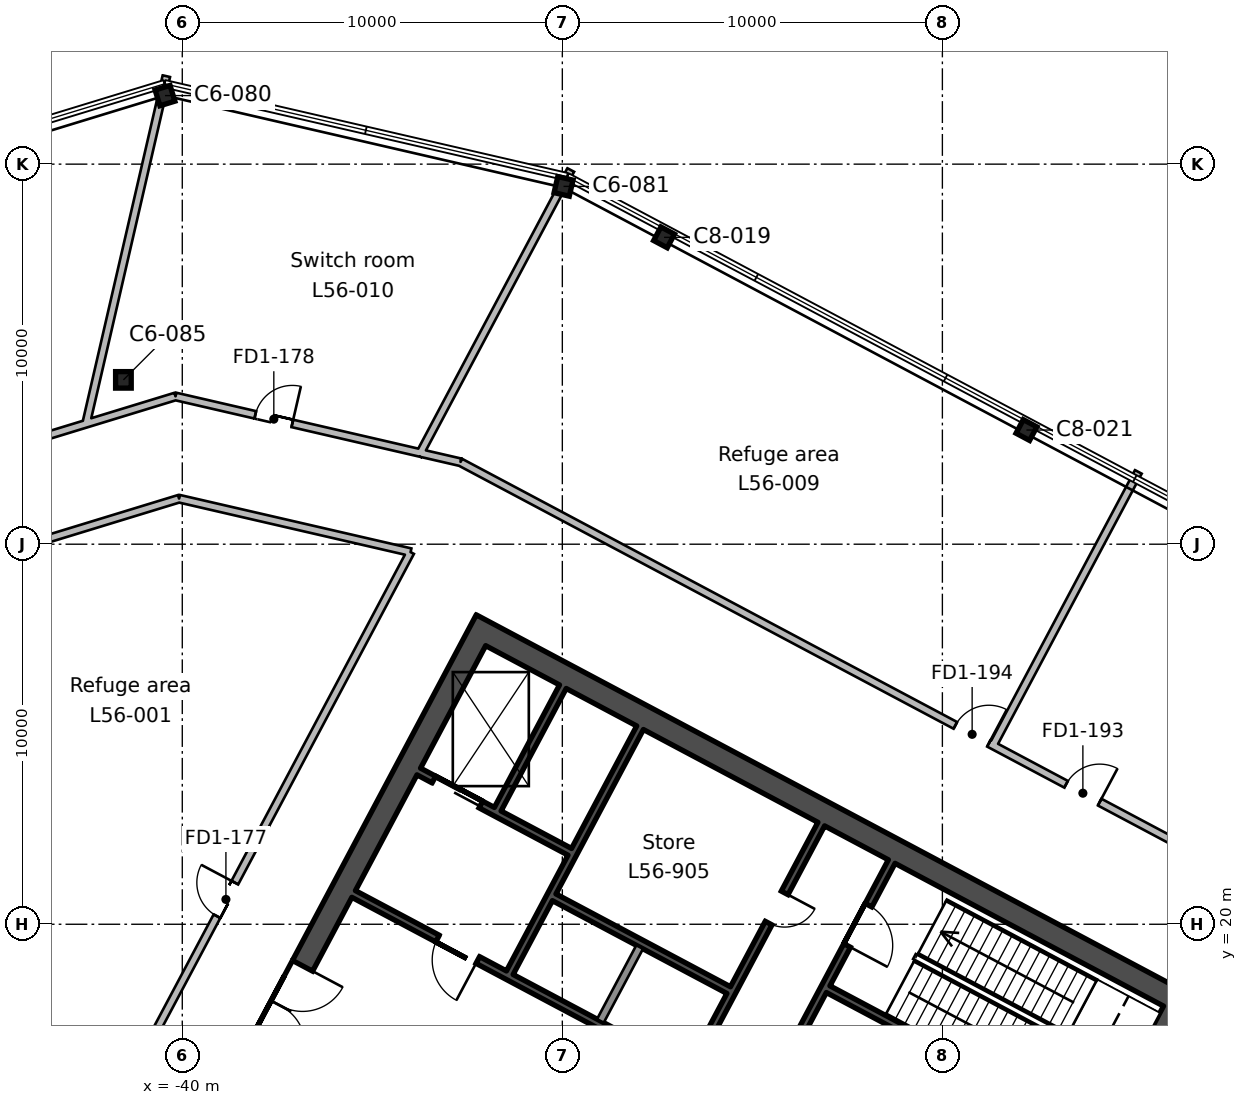
"""IFC4 building model, lengths in metres.
Left out: names, types, materials, properties, quantities, classifications, styles, units other than length and angle.
Written with IfcOpenShell. Run it as: python <this file> out.ifc"""

import sys

from ifc_helpers import new_model, si_unit, direction, frame, frame_2d, origin, origin_2d, place, context, subcontext, project, spatial, rectangle, i_section, extrude, element, fill, save


model = new_model("IFC4")
c1 = context("Model", 3, precision=1e-05, world=origin(), true_north=direction((0.0, 1.0)))
c2 = subcontext(c1, "Body", "Model", "MODEL_VIEW")
j1 = project(units=[si_unit("LENGTHUNIT", "METRE"), si_unit("PLANEANGLEUNIT", "RADIAN")], contexts=[c1])
p1 = place(None, origin())
s1 = spatial("IfcSite", under=j1, at=p1, CompositionType="ELEMENT")
p2 = place(p1, origin())
s2 = spatial("IfcBuilding", under=s1, at=p2, CompositionType="ELEMENT")
p3 = place(p2, frame((0.0, 0.0, 252.0)))
s3 = spatial("IfcBuildingStorey", under=s2, at=p3, CompositionType="ELEMENT", Elevation=252.0)
p4 = place(p3, frame((-17.788, 33.004, 0.0), z_axis=(0.0, 0.0, 1.0), x_axis=(-0.882947592859, 0.469471562786, 0.0)))
e1 = element("IfcColumn", 1, at=p4, inside=s3, PredefinedType="COLUMN", context=c2, shape_type="SweptSolid", body=[
    extrude(i_section(OverallWidth=0.404, OverallDepth=0.406, WebThickness=0.027, FlangeThickness=0.044, FilletRadius=0.015, at=origin_2d()), origin(), (0.0, 0.0, 1.0), 6.0),
])
p5 = place(p3, frame((-41.549, 34.324, 0.0), z_axis=(0.0, 0.0, 1.0), x_axis=(1.0, 0.0, 0.0)))
e2 = element("IfcColumn", 2, at=p5, inside=s3, PredefinedType="COLUMN", context=c2, shape_type="SweptSolid", body=[
    extrude(i_section(OverallWidth=0.412, OverallDepth=0.434, WebThickness=0.036, FlangeThickness=0.057, FilletRadius=0.015, at=origin_2d()), origin(), (0.0, 0.0, 1.0), 6.0),
])
p6 = place(p3, frame((-27.323, 38.074, 0.0), z_axis=(0.0, 0.0, 1.0), x_axis=(-0.882947592859, 0.469471562786, 0.0)))
e3 = element("IfcColumn", 3, at=p6, inside=s3, PredefinedType="COLUMN", context=c2, shape_type="SweptSolid", body=[
    extrude(i_section(OverallWidth=0.404, OverallDepth=0.406, WebThickness=0.027, FlangeThickness=0.044, FilletRadius=0.015, at=origin_2d()), origin(), (0.0, 0.0, 1.0), 6.0),
])
for number, where, z_axis, x_axis in (
    (4, (-29.968, 39.415, 0.0), (0.0, 0.0, 1.0), (-0.974, 0.225, 0.0)),
    (5, (-40.455, 41.804, 0.0), (0.0, 0.0, 1.0), (-0.956, -0.292, 0.0)),
):
    element("IfcColumn", number, at=place(p3, frame(where, z_axis=z_axis, x_axis=x_axis)), inside=s3, PredefinedType="COLUMN", context=c2, shape_type="SweptSolid", body=[
        extrude(i_section(OverallWidth=0.412, OverallDepth=0.434, WebThickness=0.036, FlangeThickness=0.057, FilletRadius=0.015, at=origin_2d()), origin(), (0.0, 0.0, 1.0), 6.0),
    ])
p7 = place(p3, frame((-13.635, 18.236, 0.0), z_axis=(0.0, 0.0, 1.0), x_axis=(-0.469478769487, -0.88294376095, 0.0)))
e6 = element("IfcWall", 6, at=p7, inside=s3, PredefinedType="SHEAR", context=c2, shape_type="SweptSolid", body=[
    extrude(rectangle(XDim=19.4, YDim=0.6, at=frame_2d((9.7, 0.0))), origin(), (0.0, 0.0, 1.0), 6.0),
])
p8 = place(p7, frame((6.7, 0.0, 0.0)))
e7 = element("IfcOpeningElement", 7, at=p8, cuts=e6, PredefinedType="OPENING", context=c2, shape_type="SweptSolid", body=[
    extrude(rectangle(XDim=2.4, YDim=2.4, at=frame_2d((1.2, 1.2))), frame((0.0, 0.31, 0.0), z_axis=(0.0, -1.0, 0.0), x_axis=(1.0, 0.0, 0.0)), (0.0, 0.0, 1.0), 0.62),
])
p9 = place(p3, frame((-32.0, 28.001, 0.0), z_axis=(0.0, 0.0, 1.0), x_axis=(-0.469468958625, -0.882948977511, 0.0)))
e8 = element("IfcWall", 8, at=p9, inside=s3, PredefinedType="SHEAR", context=c2, shape_type="SweptSolid", body=[
    extrude(rectangle(XDim=19.4, YDim=0.6, at=frame_2d((9.7, 0.0))), origin(), (0.0, 0.0, 1.0), 6.0),
])
p10 = place(p9, frame((10.3, 0.0, 0.0)))
e9 = element("IfcOpeningElement", 9, at=p10, cuts=e8, PredefinedType="OPENING", context=c2, shape_type="SweptSolid", body=[
    extrude(rectangle(XDim=2.4, YDim=2.4, at=frame_2d((1.2, 1.2))), frame((0.0, 0.31, 0.0), z_axis=(0.0, -1.0, 0.0), x_axis=(1.0, 0.0, 0.0)), (0.0, 0.0, 1.0), 0.62),
])
p11 = place(p3, frame((-14.041, 18.112, 0.0), z_axis=(0.0, 0.0, 1.0), x_axis=(-0.882947755831, 0.46947125628, 0.0)))
e10 = element("IfcWall", 10, at=p11, inside=s3, PredefinedType="SHEAR", context=c2, shape_type="SweptSolid", body=[
    extrude(rectangle(XDim=20.2, YDim=0.6, at=frame_2d((10.1, 0.0))), origin(), (0.0, 0.0, 1.0), 6.0),
])
p12 = place(p3, frame((-21.333, 21.649, 0.0), z_axis=(0.0, 0.0, 1.0), x_axis=(-0.469494272526, -0.882935517501, 0.0)))
e11 = element("IfcWall", 11, at=p12, inside=s3, PredefinedType="SHEAR", context=c2, shape_type="SweptSolid", body=[
    extrude(rectangle(XDim=7.3, YDim=0.2, at=frame_2d((3.65, 0.0))), origin(), (0.0, 0.0, 1.0), 6.0),
])
p13 = place(p12, frame((1.3, 0.0, 0.0)))
e12 = element("IfcOpeningElement", 12, at=p13, cuts=e11, PredefinedType="OPENING", context=c2, shape_type="SweptSolid", body=[
    extrude(rectangle(XDim=1.2, YDim=2.1, at=frame_2d((0.6, 1.05))), frame((0.0, 0.11, 0.0), z_axis=(0.0, -1.0, 0.0), x_axis=(1.0, 0.0, 0.0)), (0.0, 0.0, 1.0), 0.22),
])
p14 = place(p3, frame((-23.188, 22.635, 0.0), z_axis=(0.0, 0.0, 1.0), x_axis=(-0.469454336211, -0.882956752176, 0.0)))
e13 = element("IfcWall", 13, at=p14, inside=s3, PredefinedType="SHEAR", context=c2, shape_type="SweptSolid", body=[
    extrude(rectangle(XDim=7.3, YDim=0.2, at=frame_2d((3.65, 0.0))), origin(), (0.0, 0.0, 1.0), 6.0),
])
p15 = place(p14, frame((2.05, 0.0, 0.0)))
e14 = element("IfcOpeningElement", 14, at=p15, cuts=e13, PredefinedType="OPENING", context=c2, shape_type="SweptSolid", body=[
    extrude(rectangle(XDim=0.9, YDim=2.1, at=frame_2d((0.45, 1.05))), frame((0.0, 0.11, 0.0), z_axis=(0.0, -1.0, 0.0), x_axis=(1.0, 0.0, 0.0)), (0.0, 0.0, 1.0), 0.22),
])
p16 = place(p3, frame((-27.966, 19.4, 0.0), z_axis=(0.0, 0.0, 1.0), x_axis=(-0.4694473164, -0.882960484464, 0.0)))
e15 = element("IfcWall", 15, at=p16, inside=s3, PredefinedType="SOLIDWALL", context=c2, shape_type="SweptSolid", body=[
    extrude(rectangle(XDim=2.2, YDim=0.2, at=frame_2d((1.1, 0.0))), origin(), (0.0, 0.0, 1.0), 6.0),
])
p17 = place(p3, frame((-27.955, 25.171, 0.0), z_axis=(0.0, 0.0, 1.0), x_axis=(-0.469480409012, -0.88294288918, 0.0)))
e16 = element("IfcWall", 16, at=p17, inside=s3, PredefinedType="SHEAR", context=c2, shape_type="SweptSolid", body=[
    extrude(rectangle(XDim=7.3, YDim=0.2, at=frame_2d((3.65, 0.0))), origin(), (0.0, 0.0, 1.0), 6.0),
])
p18 = place(p3, frame((-29.986, 26.25, 0.0), z_axis=(0.0, 0.0, 1.0), x_axis=(-0.469494272526, -0.882935517501, 0.0)))
e17 = element("IfcWall", 17, at=p18, inside=s3, PredefinedType="SHEAR", context=c2, shape_type="SweptSolid", body=[
    extrude(rectangle(XDim=3.65, YDim=0.2, at=frame_2d((1.825, 0.0))), origin(), (0.0, 0.0, 1.0), 6.0),
])
p19 = place(p3, frame((-15.942, 14.536, 0.0), z_axis=(0.0, 0.0, 1.0), x_axis=(-0.882946947542, 0.469472776449, 0.0)))
e18 = element("IfcWall", 18, at=p19, inside=s3, PredefinedType="SHEAR", context=c2, shape_type="SweptSolid", body=[
    extrude(rectangle(XDim=8.0, YDim=0.2, at=frame_2d((4.0, 0.0))), origin(), (0.0, 0.0, 1.0), 6.0),
])
p20 = place(p3, frame((-29.804, 21.906, 0.0), z_axis=(0.0, 0.0, 1.0), x_axis=(-0.882960433586, 0.469447412093, 0.0)))
e19 = element("IfcWall", 19, at=p20, inside=s3, PredefinedType="SHEAR", context=c2, shape_type="SweptSolid", body=[
    extrude(rectangle(XDim=4.5, YDim=0.2, at=frame_2d((2.25, 0.0))), origin(), (0.0, 0.0, 1.0), 6.0),
])
p21 = place(p20, frame((2.65, 0.0, 0.0)))
e20 = element("IfcOpeningElement", 20, at=p21, cuts=e19, PredefinedType="OPENING", context=c2, shape_type="SweptSolid", body=[
    extrude(rectangle(XDim=1.4, YDim=2.4, at=frame_2d((0.7, 1.2))), frame((0.0, 0.11, 0.0), z_axis=(0.0, -1.0, 0.0), x_axis=(1.0, 0.0, 0.0)), (0.0, 0.0, 1.0), 0.22),
])
p22 = place(p3, frame((-25.623, 18.268, 0.0), z_axis=(0.0, 0.0, 1.0), x_axis=(-0.882953967957, 0.469459572775, 0.0)))
e21 = element("IfcWall", 21, at=p22, inside=s3, PredefinedType="SHEAR", context=c2, shape_type="SweptSolid", body=[
    extrude(rectangle(XDim=5.2, YDim=0.2, at=frame_2d((2.6, 0.0))), origin(), (0.0, 0.0, 1.0), 6.0),
])
p23 = place(p3, frame((-26.662, 16.102, 0.0), z_axis=(0.0, 0.0, 1.0), x_axis=(-0.882940221191, 0.469485426614, 0.0)))
e22 = element("IfcWall", 22, at=p23, inside=s3, PredefinedType="SHEAR", context=c2, shape_type="SweptSolid", body=[
    extrude(rectangle(XDim=10.0, YDim=0.2, at=frame_2d((5.0, 0.0))), origin(), (0.0, 0.0, 1.0), 6.0),
])
p24 = place(p23, frame((6.3, 0.0, 0.0)))
e23 = element("IfcOpeningElement", 23, at=p24, cuts=e22, PredefinedType="OPENING", context=c2, shape_type="SweptSolid", body=[
    extrude(rectangle(XDim=1.2, YDim=2.1, at=frame_2d((0.6, 1.05))), frame((0.0, 0.11, 0.0), z_axis=(0.0, -1.0, 0.0), x_axis=(1.0, 0.0, 0.0)), (0.0, 0.0, 1.0), 0.22),
])
p25 = place(p3, frame((-42.5, 33.178, 0.0), z_axis=(0.0, 0.0, 1.0), x_axis=(-0.956286285355, -0.292432112536, 0.0)))
e24 = element("IfcWall", 24, at=p25, inside=s3, PredefinedType="PARTITIONING", context=c2, shape_type="SweptSolid", body=[
    extrude(rectangle(XDim=4.182, YDim=0.2, at=frame_2d((2.091, 0.0))), origin(), (0.0, 0.0, 1.0), 5.55),
])
p26 = place(p25, frame((1.681, 0.0, 0.0)))
e25 = element("IfcOpeningElement", 25, at=p26, cuts=e24, PredefinedType="OPENING", context=c2, shape_type="SweptSolid", body=[
    extrude(rectangle(XDim=1.0, YDim=2.1, at=frame_2d((0.5, 1.05))), frame((0.0, 0.11, 0.0), z_axis=(0.0, -1.0, 0.0), x_axis=(1.0, 0.0, 0.0)), (0.0, 0.0, 1.0), 0.22),
])
p27 = place(p3, frame((-45.073, 29.673, 0.0), z_axis=(0.0, 0.0, 1.0), x_axis=(0.9563257737, 0.292302949965, 0.0)))
e26 = element("IfcWall", 26, at=p27, inside=s3, PredefinedType="PARTITIONING", context=c2, shape_type="SweptSolid", body=[
    extrude(rectangle(XDim=5.217, YDim=0.2, at=frame_2d((2.608, 0.0))), origin(), (0.0, 0.0, 1.0), 5.55),
])
p28 = place(p3, frame((-40.084, 31.198, 0.0), z_axis=(0.0, 0.0, 1.0), x_axis=(0.974378029488, -0.22491655264, 0.0)))
e27 = element("IfcWall", 27, at=p28, inside=s3, PredefinedType="PARTITIONING", context=c2, shape_type="SweptSolid", body=[
    extrude(rectangle(XDim=6.251, YDim=0.2, at=frame_2d((3.125, 0.0))), origin(), (0.0, 0.0, 1.0), 5.55),
])
p29 = place(p3, frame((-33.993, 29.792, 0.0), z_axis=(0.0, 0.0, 1.0), x_axis=(-0.469462883155, -0.882952207846, 0.0)))
e28 = element("IfcWall", 28, at=p29, inside=s3, PredefinedType="PARTITIONING", context=c2, shape_type="SweptSolid", body=[
    extrude(rectangle(XDim=20.692, YDim=0.2, at=frame_2d((10.346, 0.0))), origin(), (0.0, 0.0, 1.0), 5.55),
])
p30 = place(p29, frame((9.85, 0.0, 0.0)))
e29 = element("IfcOpeningElement", 29, at=p30, cuts=e28, PredefinedType="OPENING", context=c2, shape_type="SweptSolid", body=[
    extrude(rectangle(XDim=1.0, YDim=2.1, at=frame_2d((0.5, 1.05))), frame((0.0, 0.11, 0.0), z_axis=(0.0, -1.0, 0.0), x_axis=(1.0, 0.0, 0.0)), (0.0, 0.0, 1.0), 0.22),
])
p31 = place(p3, frame((-40.419, 42.315, 0.0), z_axis=(0.0, 0.0, 1.0), x_axis=(-0.225005769503, -0.974357431177, 0.0)))
e30 = element("IfcWall", 30, at=p31, inside=s3, PredefinedType="PARTITIONING", context=c2, shape_type="SweptSolid", body=[
    extrude(rectangle(XDim=9.387, YDim=0.2, at=frame_2d((4.693, 0.0))), origin(), (0.0, 0.0, 1.0), 5.55),
])
p32 = place(p3, frame((-34.912, 32.672, 0.0), z_axis=(0.0, 0.0, 1.0), x_axis=(-0.974366064539, 0.224968380611, 0.0)))
e31 = element("IfcWall", 31, at=p32, inside=s3, PredefinedType="PARTITIONING", context=c2, shape_type="SweptSolid", body=[
    extrude(rectangle(XDim=5.404, YDim=0.2, at=frame_2d((2.702, 0.0))), origin(), (0.0, 0.0, 1.0), 5.55),
])
p33 = place(p32, frame((2.25, 0.0, 0.0)))
e32 = element("IfcOpeningElement", 32, at=p33, cuts=e31, PredefinedType="OPENING", context=c2, shape_type="SweptSolid", body=[
    extrude(rectangle(XDim=1.0, YDim=2.1, at=frame_2d((0.5, 1.05))), frame((0.0, 0.11, 0.0), z_axis=(0.0, -1.0, 0.0), x_axis=(1.0, 0.0, 0.0)), (0.0, 0.0, 1.0), 0.22),
])
p34 = place(p3, frame((-40.178, 33.888, 0.0), z_axis=(0.0, 0.0, 1.0), x_axis=(-0.956299260122, -0.292389680205, 0.0)))
e33 = element("IfcWall", 33, at=p34, inside=s3, PredefinedType="PARTITIONING", context=c2, shape_type="SweptSolid", body=[
    extrude(rectangle(XDim=2.428, YDim=0.2, at=frame_2d((1.214, 0.0))), origin(), (0.0, 0.0, 1.0), 5.55),
])
p35 = place(p3, frame((-34.912, 32.672, 0.0), z_axis=(0.0, 0.0, 1.0), x_axis=(0.974301441447, -0.225248088102, 0.0)))
e34 = element("IfcWall", 34, at=p35, inside=s3, PredefinedType="PARTITIONING", context=c2, shape_type="SweptSolid", body=[
    extrude(rectangle(XDim=1.239, YDim=0.2, at=frame_2d((0.619, 0.0))), origin(), (0.0, 0.0, 1.0), 5.55),
])
p36 = place(p3, frame((-29.779, 39.846, 0.0), z_axis=(0.0, 0.0, 1.0), x_axis=(-0.46950589154, -0.88292933908, 0.0)))
e35 = element("IfcWall", 35, at=p36, inside=s3, PredefinedType="PARTITIONING", context=c2, shape_type="SweptSolid", body=[
    extrude(rectangle(XDim=8.432, YDim=0.2, at=frame_2d((4.216, 0.0))), origin(), (0.0, 0.0, 1.0), 5.55),
])
p37 = place(p3, frame((-32.682, 32.157, 0.0), z_axis=(0.0, 0.0, 1.0), x_axis=(-0.974399032113, 0.224825546183, 0.0)))
e36 = element("IfcWall", 36, at=p37, inside=s3, PredefinedType="PARTITIONING", context=c2, shape_type="SweptSolid", body=[
    extrude(rectangle(XDim=1.05, YDim=0.2, at=frame_2d((0.525, 0.0))), origin(), (0.0, 0.0, 1.0), 5.55),
])
p38 = place(p3, frame((-32.682, 32.157, 0.0), z_axis=(0.0, 0.0, 1.0), x_axis=(0.88295110087, -0.469464965118, 0.0)))
e37 = element("IfcWall", 37, at=p38, inside=s3, PredefinedType="PARTITIONING", context=c2, shape_type="SweptSolid", body=[
    extrude(rectangle(XDim=37.014, YDim=0.2, at=frame_2d((18.507, 0.0))), origin(), (0.0, 0.0, 1.0), 5.55),
])
p39 = place(p38, frame((18.05, 0.0, 0.0)))
e38 = element("IfcOpeningElement", 38, at=p39, cuts=e37, PredefinedType="OPENING", context=c2, shape_type="SweptSolid", body=[
    extrude(rectangle(XDim=1.0, YDim=2.1, at=frame_2d((0.5, 1.05))), frame((0.0, 0.11, 0.0), z_axis=(0.0, -1.0, 0.0), x_axis=(1.0, 0.0, 0.0)), (0.0, 0.0, 1.0), 0.22),
])
p40 = place(p38, frame((14.75, 0.0, 0.0)))
e39 = element("IfcOpeningElement", 39, at=p40, cuts=e37, PredefinedType="OPENING", context=c2, shape_type="SweptSolid", body=[
    extrude(rectangle(XDim=1.0, YDim=2.1, at=frame_2d((0.5, 1.05))), frame((0.0, 0.11, 0.0), z_axis=(0.0, -1.0, 0.0), x_axis=(1.0, 0.0, 0.0)), (0.0, 0.0, 1.0), 0.22),
])
p41 = place(p3, frame((-14.844, 31.903, 0.0), z_axis=(0.0, 0.0, 1.0), x_axis=(-0.469351618214, -0.883011358069, 0.0)))
e40 = element("IfcWall", 40, at=p41, inside=s3, PredefinedType="PARTITIONING", context=c2, shape_type="SweptSolid", body=[
    extrude(rectangle(XDim=8.149, YDim=0.2, at=frame_2d((4.075, 0.0))), origin(), (0.0, 0.0, 1.0), 5.55),
])
p42 = place(p3, frame((-20.799, -0.776, 0.0), z_axis=(0.0, 0.0, 1.0), x_axis=(0.469488010228, 0.882938847402, 0.0)))
e41 = element("IfcWall", 41, at=p42, inside=s3, PredefinedType="PARTITIONING", context=c2, shape_type="SweptSolid", body=[
    extrude(rectangle(XDim=20.899, YDim=0.2, at=frame_2d((10.45, 0.0))), origin(), (0.0, 0.0, 1.0), 5.55),
])
p43 = place(p42, frame((9.95, 0.0, 0.0)))
e42 = element("IfcOpeningElement", 42, at=p43, cuts=e41, PredefinedType="OPENING", context=c2, shape_type="SweptSolid", body=[
    extrude(rectangle(XDim=1.0, YDim=2.1, at=frame_2d((0.5, 1.05))), frame((0.0, 0.11, 0.0), z_axis=(0.0, -1.0, 0.0), x_axis=(1.0, 0.0, 0.0)), (0.0, 0.0, 1.0), 0.22),
])
p44 = place(p10, origin())
e43 = element("IfcDoor", 43, at=p44, inside=s3, OperationType="DOUBLE_DOOR_SINGLE_SWING", PredefinedType="DOOR", context=c2, shape_type="SweptSolid", body=[
    extrude(rectangle(XDim=2.4, YDim=2.4, at=frame_2d((1.2, 1.2))), frame((0.0, 0.025, 0.0), z_axis=(0.0, -1.0, 0.0), x_axis=(1.0, 0.0, 0.0)), (0.0, 0.0, 1.0), 0.05),
])
fill(e9, e43)
p45 = place(p24, origin())
e44 = element("IfcDoor", 44, at=p45, inside=s3, OperationType="SINGLE_SWING_LEFT", PredefinedType="DOOR", context=c2, shape_type="SweptSolid", body=[
    extrude(rectangle(XDim=1.2, YDim=2.1, at=frame_2d((0.6, 1.05))), frame((0.0, 0.025, 0.0), z_axis=(0.0, -1.0, 0.0), x_axis=(1.0, 0.0, 0.0)), (0.0, 0.0, 1.0), 0.05),
])
fill(e23, e44)
p46 = place(p13, origin())
e45 = element("IfcDoor", 45, at=p46, inside=s3, OperationType="SINGLE_SWING_RIGHT", PredefinedType="DOOR", context=c2, shape_type="SweptSolid", body=[
    extrude(rectangle(XDim=1.2, YDim=2.1, at=frame_2d((0.6, 1.05))), frame((0.0, 0.025, 0.0), z_axis=(0.0, -1.0, 0.0), x_axis=(1.0, 0.0, 0.0)), (0.0, 0.0, 1.0), 0.05),
])
fill(e12, e45)
p47 = place(p21, origin())
e46 = element("IfcDoor", 46, at=p47, inside=s3, OperationType="DOUBLE_DOOR_SLIDING", PredefinedType="DOOR", context=c2, shape_type="SweptSolid", body=[
    extrude(rectangle(XDim=1.4, YDim=2.4, at=frame_2d((0.7, 1.2))), frame((0.0, 0.025, 0.0), z_axis=(0.0, -1.0, 0.0), x_axis=(1.0, 0.0, 0.0)), (0.0, 0.0, 1.0), 0.05),
])
fill(e20, e46)
p48 = place(p15, origin())
e47 = element("IfcDoor", 47, at=p48, inside=s3, OperationType="SINGLE_SWING_LEFT", PredefinedType="DOOR", context=c2, shape_type="SweptSolid", body=[
    extrude(rectangle(XDim=0.9, YDim=2.1, at=frame_2d((0.45, 1.05))), frame((0.0, 0.025, 0.0), z_axis=(0.0, -1.0, 0.0), x_axis=(1.0, 0.0, 0.0)), (0.0, 0.0, 1.0), 0.05),
])
fill(e14, e47)
p49 = place(p30, frame((1.0, 0.0, 0.0), z_axis=(0.0, 0.0, 1.0), x_axis=(-1.0, 0.0, 0.0)))
e48 = element("IfcDoor", 48, at=p49, inside=s3, OperationType="SINGLE_SWING_RIGHT", PredefinedType="DOOR", context=c2, shape_type="SweptSolid", body=[
    extrude(rectangle(XDim=1.0, YDim=2.1, at=frame_2d((0.5, 1.05))), frame((0.0, 0.025, 0.0), z_axis=(0.0, -1.0, 0.0), x_axis=(1.0, 0.0, 0.0)), (0.0, 0.0, 1.0), 0.05),
])
fill(e29, e48)
p50 = place(p39, origin())
e49 = element("IfcDoor", 49, at=p50, inside=s3, OperationType="SINGLE_SWING_RIGHT", PredefinedType="DOOR", context=c2, shape_type="SweptSolid", body=[
    extrude(rectangle(XDim=1.0, YDim=2.1, at=frame_2d((0.5, 1.05))), frame((0.0, 0.025, 0.0), z_axis=(0.0, -1.0, 0.0), x_axis=(1.0, 0.0, 0.0)), (0.0, 0.0, 1.0), 0.05),
])
fill(e38, e49)
p51 = place(p40, origin())
e50 = element("IfcDoor", 50, at=p51, inside=s3, OperationType="SINGLE_SWING_RIGHT", PredefinedType="DOOR", context=c2, shape_type="SweptSolid", body=[
    extrude(rectangle(XDim=1.0, YDim=2.1, at=frame_2d((0.5, 1.05))), frame((0.0, 0.025, 0.0), z_axis=(0.0, -1.0, 0.0), x_axis=(1.0, 0.0, 0.0)), (0.0, 0.0, 1.0), 0.05),
])
fill(e39, e50)
p52 = place(p33, frame((1.0, 0.0, 0.0), z_axis=(0.0, 0.0, 1.0), x_axis=(-1.0, 0.0, 0.0)))
e51 = element("IfcDoor", 51, at=p52, inside=s3, OperationType="SINGLE_SWING_RIGHT", PredefinedType="DOOR", context=c2, shape_type="SweptSolid", body=[
    extrude(rectangle(XDim=1.0, YDim=2.1, at=frame_2d((0.5, 1.05))), frame((0.0, 0.025, 0.0), z_axis=(0.0, -1.0, 0.0), x_axis=(1.0, 0.0, 0.0)), (0.0, 0.0, 1.0), 0.05),
])
fill(e32, e51)
save(model, sys.argv[1])
